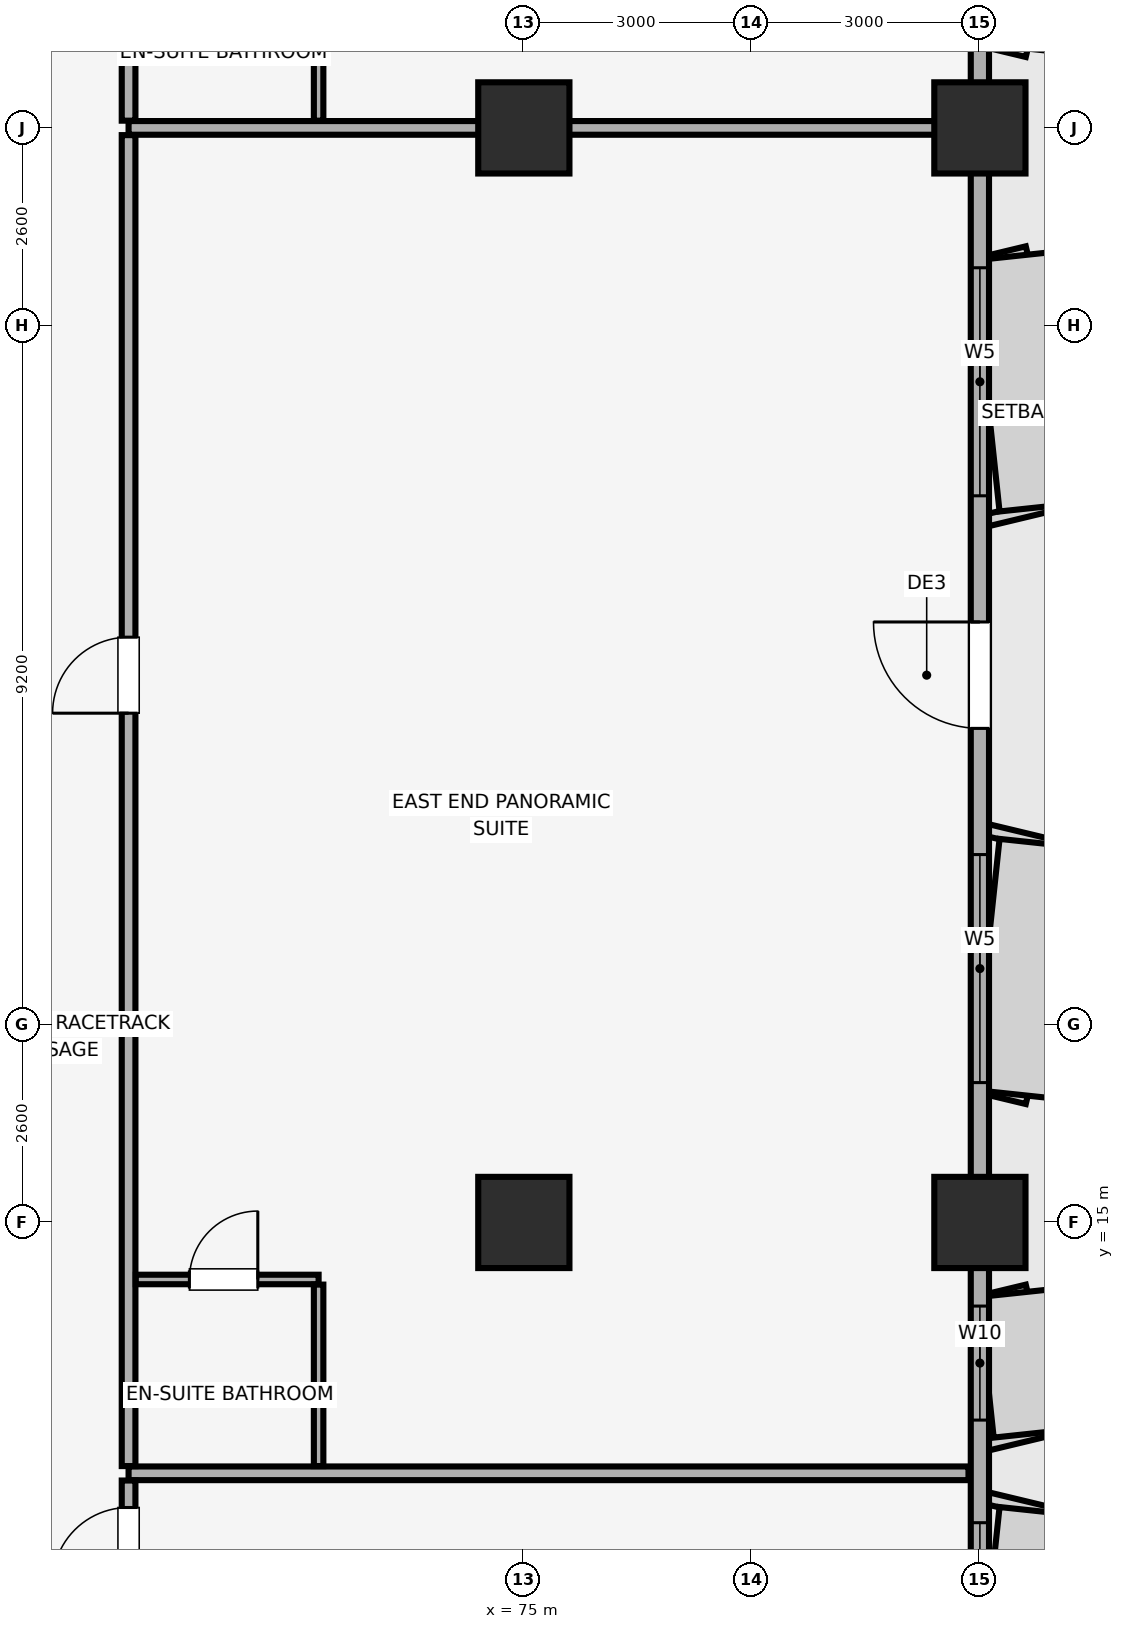
"""IFC4 building model, lengths in metres.
Left out: names, types, materials, properties, quantities, classifications, styles, units other than length and angle.
Written with IfcOpenShell. Run it as: python <this file> out.ifc"""

import sys

from ifc_helpers import new_model, si_unit, direction, frame, frame_2d, origin, origin_2d, place, context, subcontext, project, spatial, rectangle, extrude, element, fill, save


model = new_model("IFC4")
c1 = context("Model", 3, precision=1e-05, world=origin(), true_north=direction((0.0, 1.0)))
c2 = subcontext(c1, "Body", "Model", "MODEL_VIEW")
j1 = project(units=[si_unit("LENGTHUNIT", "METRE"), si_unit("PLANEANGLEUNIT", "RADIAN")], contexts=[c1])
p1 = place(None, origin())
s1 = spatial("IfcSite", under=j1, at=p1, CompositionType="ELEMENT")
p2 = place(p1, origin())
s2 = spatial("IfcBuilding", under=s1, at=p2, CompositionType="ELEMENT")
p3 = place(p2, frame((0.0, 0.0, 135.35)))
s3 = spatial("IfcBuildingStorey", under=s2, at=p3, CompositionType="ELEMENT", Elevation=135.35)
for number, where, z_axis, x_axis in (
    (1, (81.0, 15.0, 0.0), (0.0, 0.0, 1.0), (1.0, 0.0, 0.0)),
    (2, (81.0, 29.4, 0.0), (0.0, 0.0, 1.0), (1.0, 0.0, 0.0)),
    (3, (75.0, 15.0, 0.0), (0.0, 0.0, 1.0), (1.0, 0.0, 0.0)),
    (4, (75.0, 29.4, 0.0), (0.0, 0.0, 1.0), (1.0, 0.0, 0.0)),
):
    element("IfcColumn", number, at=place(p3, frame(where, z_axis=z_axis, x_axis=x_axis)), inside=s3, PredefinedType="COLUMN", context=c2, shape_type="SweptSolid", body=[
        extrude(rectangle(XDim=1.2, YDim=1.2, at=origin_2d()), origin(), (0.0, 0.0, 1.0), 3.56),
    ])
p4 = place(p3, frame((81.0, 7.0, 0.0), z_axis=(0.0, 0.0, 1.0), x_axis=(0.0, 1.0, 0.0)))
e5 = element("IfcWall", 5, at=p4, inside=s3, PredefinedType="SOLIDWALL", context=c2, shape_type="SweptSolid", body=[
    extrude(rectangle(XDim=38.0, YDim=0.24, at=frame_2d((19.0, 0.0))), origin(), (0.0, 0.0, 1.0), 2.61),
])
p5 = place(p4, frame((14.5, 0.0, 0.0)))
e6 = element("IfcOpeningElement", 6, at=p5, cuts=e5, PredefinedType="OPENING", context=c2, shape_type="SweptSolid", body=[
    extrude(rectangle(XDim=1.4, YDim=2.2, at=frame_2d((0.7, 1.1))), frame((0.0, 0.13, 0.0), z_axis=(0.0, -1.0, 0.0), x_axis=(1.0, 0.0, 0.0)), (0.0, 0.0, 1.0), 0.26),
])
p6 = place(p4, frame((1.05, 0.0, 0.85)))
e7 = element("IfcOpeningElement", 7, at=p6, cuts=e5, PredefinedType="OPENING", context=c2, shape_type="SweptSolid", body=[
    extrude(rectangle(XDim=3.0, YDim=1.5, at=frame_2d((1.5, 0.75))), frame((0.0, 0.13, 0.0), z_axis=(0.0, -1.0, 0.0), x_axis=(1.0, 0.0, 0.0)), (0.0, 0.0, 1.0), 0.26),
])
p7 = place(p4, frame((5.4, 0.0, 0.85)))
e8 = element("IfcOpeningElement", 8, at=p7, cuts=e5, PredefinedType="OPENING", context=c2, shape_type="SweptSolid", body=[
    extrude(rectangle(XDim=1.5, YDim=1.4, at=frame_2d((0.75, 0.7))), frame((0.0, 0.13, 0.0), z_axis=(0.0, -1.0, 0.0), x_axis=(1.0, 0.0, 0.0)), (0.0, 0.0, 1.0), 0.26),
])
p8 = place(p4, frame((9.84, 0.0, 0.85)))
e9 = element("IfcOpeningElement", 9, at=p8, cuts=e5, PredefinedType="OPENING", context=c2, shape_type="SweptSolid", body=[
    extrude(rectangle(XDim=3.0, YDim=1.5, at=frame_2d((1.5, 0.75))), frame((0.0, 0.13, 0.0), z_axis=(0.0, -1.0, 0.0), x_axis=(1.0, 0.0, 0.0)), (0.0, 0.0, 1.0), 0.26),
])
p9 = place(p4, frame((17.56, 0.0, 0.85)))
e10 = element("IfcOpeningElement", 10, at=p9, cuts=e5, PredefinedType="OPENING", context=c2, shape_type="SweptSolid", body=[
    extrude(rectangle(XDim=3.0, YDim=1.5, at=frame_2d((1.5, 0.75))), frame((0.0, 0.13, 0.0), z_axis=(0.0, -1.0, 0.0), x_axis=(1.0, 0.0, 0.0)), (0.0, 0.0, 1.0), 0.26),
])
p10 = place(p4, frame((23.615, 0.0, 0.85)))
e11 = element("IfcOpeningElement", 11, at=p10, cuts=e5, PredefinedType="OPENING", context=c2, shape_type="SweptSolid", body=[
    extrude(rectangle(XDim=3.0, YDim=1.5, at=frame_2d((1.5, 0.75))), frame((0.0, 0.13, 0.0), z_axis=(0.0, -1.0, 0.0), x_axis=(1.0, 0.0, 0.0)), (0.0, 0.0, 1.0), 0.26),
])
p11 = place(p4, frame((28.385, 0.0, 0.85)))
e12 = element("IfcOpeningElement", 12, at=p11, cuts=e5, PredefinedType="OPENING", context=c2, shape_type="SweptSolid", body=[
    extrude(rectangle(XDim=3.0, YDim=1.5, at=frame_2d((1.5, 0.75))), frame((0.0, 0.13, 0.0), z_axis=(0.0, -1.0, 0.0), x_axis=(1.0, 0.0, 0.0)), (0.0, 0.0, 1.0), 0.26),
])
p12 = place(p4, frame((33.915, 0.0, 0.85)))
e13 = element("IfcOpeningElement", 13, at=p12, cuts=e5, PredefinedType="OPENING", context=c2, shape_type="SweptSolid", body=[
    extrude(rectangle(XDim=3.0, YDim=1.5, at=frame_2d((1.5, 0.75))), frame((0.0, 0.13, 0.0), z_axis=(0.0, -1.0, 0.0), x_axis=(1.0, 0.0, 0.0)), (0.0, 0.0, 1.0), 0.26),
])
p13 = place(p3, frame((69.8, 11.7, 0.0), z_axis=(0.0, 0.0, 1.0), x_axis=(1.0, 0.0, 0.0)))
e14 = element("IfcWall", 14, at=p13, inside=s3, PredefinedType="PARTITIONING", context=c2, shape_type="SweptSolid", body=[
    extrude(rectangle(XDim=11.05, YDim=0.18, at=frame_2d((5.525, 0.0))), origin(), (0.0, 0.0, 1.0), 3.56),
])
p14 = place(p3, frame((69.8, 9.895, 0.0), z_axis=(0.0, 0.0, 1.0), x_axis=(0.0, 1.0, 0.0)))
e15 = element("IfcWall", 15, at=p14, inside=s3, PredefinedType="PARTITIONING", context=c2, shape_type="SweptSolid", body=[
    extrude(rectangle(XDim=1.71, YDim=0.18, at=frame_2d((0.855, 0.0))), origin(), (0.0, 0.0, 1.0), 3.56),
])
p15 = place(p14, frame((0.355, 0.0, 0.0)))
e16 = element("IfcOpeningElement", 16, at=p15, cuts=e15, PredefinedType="OPENING", context=c2, shape_type="SweptSolid", body=[
    extrude(rectangle(XDim=1.0, YDim=2.15, at=frame_2d((0.5, 1.075))), frame((0.0, 0.1, 0.0), z_axis=(0.0, -1.0, 0.0), x_axis=(1.0, 0.0, 0.0)), (0.0, 0.0, 1.0), 0.2),
])
p16 = place(p3, frame((69.8, 29.4, 0.0), z_axis=(0.0, 0.0, 1.0), x_axis=(1.0, 0.0, 0.0)))
e17 = element("IfcWall", 17, at=p16, inside=s3, PredefinedType="PARTITIONING", context=c2, shape_type="SweptSolid", body=[
    extrude(rectangle(XDim=11.05, YDim=0.18, at=frame_2d((5.525, 0.0))), origin(), (0.0, 0.0, 1.0), 2.91),
])
p17 = place(p3, frame((69.8, 11.795, 0.0), z_axis=(0.0, 0.0, 1.0), x_axis=(0.0, 1.0, 0.0)))
e18 = element("IfcWall", 18, at=p17, inside=s3, PredefinedType="PARTITIONING", context=c2, shape_type="SweptSolid", body=[
    extrude(rectangle(XDim=17.51, YDim=0.18, at=frame_2d((8.755, 0.0))), origin(), (0.0, 0.0, 1.0), 3.56),
])
p18 = place(p17, frame((9.905, 0.0, 0.0)))
e19 = element("IfcOpeningElement", 19, at=p18, cuts=e18, PredefinedType="OPENING", context=c2, shape_type="SweptSolid", body=[
    extrude(rectangle(XDim=1.0, YDim=2.15, at=frame_2d((0.5, 1.075))), frame((0.0, 0.1, 0.0), z_axis=(0.0, -1.0, 0.0), x_axis=(1.0, 0.0, 0.0)), (0.0, 0.0, 1.0), 0.2),
])
p19 = place(p3, frame((69.895, 14.25, 0.0), z_axis=(0.0, 0.0, 1.0), x_axis=(1.0, 0.0, 0.0)))
e20 = element("IfcWall", 20, at=p19, inside=s3, PredefinedType="PARTITIONING", context=c2, shape_type="SweptSolid", body=[
    extrude(rectangle(XDim=2.405, YDim=0.125, at=frame_2d((1.203, 0.0))), origin(), (0.0, 0.0, 1.0), 3.56),
])
p20 = place(p19, frame((0.705, 0.0, 0.0)))
e21 = element("IfcOpeningElement", 21, at=p20, cuts=e20, PredefinedType="OPENING", context=c2, shape_type="SweptSolid", body=[
    extrude(rectangle(XDim=0.9, YDim=2.1, at=frame_2d((0.45, 1.05))), frame((0.0, 0.073, 0.0), z_axis=(0.0, -1.0, 0.0), x_axis=(1.0, 0.0, 0.0)), (0.0, 0.0, 1.0), 0.145),
])
p21 = place(p3, frame((72.3, 11.795, 0.0), z_axis=(0.0, 0.0, 1.0), x_axis=(0.0, 1.0, 0.0)))
e22 = element("IfcWall", 22, at=p21, inside=s3, PredefinedType="PARTITIONING", context=c2, shape_type="SweptSolid", body=[
    extrude(rectangle(XDim=2.388, YDim=0.125, at=frame_2d((1.194, 0.0))), origin(), (0.0, 0.0, 1.0), 3.56),
])
p22 = place(p3, frame((69.8, 29.495, 0.0), z_axis=(0.0, 0.0, 1.0), x_axis=(0.0, 1.0, 0.0)))
e23 = element("IfcWall", 23, at=p22, inside=s3, PredefinedType="PARTITIONING", context=c2, shape_type="SweptSolid", body=[
    extrude(rectangle(XDim=10.26, YDim=0.18, at=frame_2d((5.13, 0.0))), origin(), (0.0, 0.0, 1.0), 3.56),
])
p23 = place(p22, frame((5.84, 0.0, 0.0)))
e24 = element("IfcOpeningElement", 24, at=p23, cuts=e23, PredefinedType="OPENING", context=c2, shape_type="SweptSolid", body=[
    extrude(rectangle(XDim=1.0, YDim=2.15, at=frame_2d((0.5, 1.075))), frame((0.0, 0.1, 0.0), z_axis=(0.0, -1.0, 0.0), x_axis=(1.0, 0.0, 0.0)), (0.0, 0.0, 1.0), 0.2),
])
p24 = place(p3, frame((72.3, 29.495, 0.0), z_axis=(0.0, 0.0, 1.0), x_axis=(0.0, 1.0, 0.0)))
e25 = element("IfcWall", 25, at=p24, inside=s3, PredefinedType="PARTITIONING", context=c2, shape_type="SweptSolid", body=[
    extrude(rectangle(XDim=2.387, YDim=0.125, at=frame_2d((1.194, 0.0))), origin(), (0.0, 0.0, 1.0), 3.56),
])
p25 = place(p5, origin())
e26 = element("IfcDoor", 26, at=p25, inside=s3, OperationType="SINGLE_SWING_RIGHT", PredefinedType="DOOR", context=c2, shape_type="SweptSolid", body=[
    extrude(rectangle(XDim=1.4, YDim=2.2, at=frame_2d((0.7, 1.1))), frame((0.0, 0.025, 0.0), z_axis=(0.0, -1.0, 0.0), x_axis=(1.0, 0.0, 0.0)), (0.0, 0.0, 1.0), 0.05),
])
fill(e6, e26)
p26 = place(p6, origin())
e27 = element("IfcWindow", 27, at=p26, inside=s3, PartitioningType="SINGLE_PANEL", PredefinedType="WINDOW", context=c2, shape_type="SweptSolid", body=[
    extrude(rectangle(XDim=3.0, YDim=1.5, at=frame_2d((1.5, 0.75))), frame((0.0, 0.03, 0.0), z_axis=(0.0, -1.0, 0.0), x_axis=(1.0, 0.0, 0.0)), (0.0, 0.0, 1.0), 0.06),
])
fill(e7, e27)
p27 = place(p7, origin())
e28 = element("IfcWindow", 28, at=p27, inside=s3, PartitioningType="SINGLE_PANEL", PredefinedType="WINDOW", context=c2, shape_type="SweptSolid", body=[
    extrude(rectangle(XDim=1.5, YDim=1.4, at=frame_2d((0.75, 0.7))), frame((0.0, 0.03, 0.0), z_axis=(0.0, -1.0, 0.0), x_axis=(1.0, 0.0, 0.0)), (0.0, 0.0, 1.0), 0.06),
])
fill(e8, e28)
p28 = place(p8, origin())
e29 = element("IfcWindow", 29, at=p28, inside=s3, PartitioningType="SINGLE_PANEL", PredefinedType="WINDOW", context=c2, shape_type="SweptSolid", body=[
    extrude(rectangle(XDim=3.0, YDim=1.5, at=frame_2d((1.5, 0.75))), frame((0.0, 0.03, 0.0), z_axis=(0.0, -1.0, 0.0), x_axis=(1.0, 0.0, 0.0)), (0.0, 0.0, 1.0), 0.06),
])
fill(e9, e29)
p29 = place(p9, origin())
e30 = element("IfcWindow", 30, at=p29, inside=s3, PartitioningType="SINGLE_PANEL", PredefinedType="WINDOW", context=c2, shape_type="SweptSolid", body=[
    extrude(rectangle(XDim=3.0, YDim=1.5, at=frame_2d((1.5, 0.75))), frame((0.0, 0.03, 0.0), z_axis=(0.0, -1.0, 0.0), x_axis=(1.0, 0.0, 0.0)), (0.0, 0.0, 1.0), 0.06),
])
fill(e10, e30)
p30 = place(p15, origin())
e31 = element("IfcDoor", 31, at=p30, inside=s3, OperationType="SINGLE_SWING_LEFT", PredefinedType="DOOR", context=c2, shape_type="SweptSolid", body=[
    extrude(rectangle(XDim=1.0, YDim=2.15, at=frame_2d((0.5, 1.075))), frame((0.0, 0.025, 0.0), z_axis=(0.0, -1.0, 0.0), x_axis=(1.0, 0.0, 0.0)), (0.0, 0.0, 1.0), 0.05),
])
fill(e16, e31)
p31 = place(p18, origin())
e32 = element("IfcDoor", 32, at=p31, inside=s3, OperationType="SINGLE_SWING_LEFT", PredefinedType="DOOR", context=c2, shape_type="SweptSolid", body=[
    extrude(rectangle(XDim=1.0, YDim=2.15, at=frame_2d((0.5, 1.075))), frame((0.0, 0.025, 0.0), z_axis=(0.0, -1.0, 0.0), x_axis=(1.0, 0.0, 0.0)), (0.0, 0.0, 1.0), 0.05),
])
fill(e19, e32)
p32 = place(p20, origin())
e33 = element("IfcDoor", 33, at=p32, inside=s3, OperationType="SINGLE_SWING_RIGHT", PredefinedType="DOOR", context=c2, shape_type="SweptSolid", body=[
    extrude(rectangle(XDim=0.9, YDim=2.1, at=frame_2d((0.45, 1.05))), frame((0.0, 0.025, 0.0), z_axis=(0.0, -1.0, 0.0), x_axis=(1.0, 0.0, 0.0)), (0.0, 0.0, 1.0), 0.05),
])
fill(e21, e33)
save(model, sys.argv[1])
